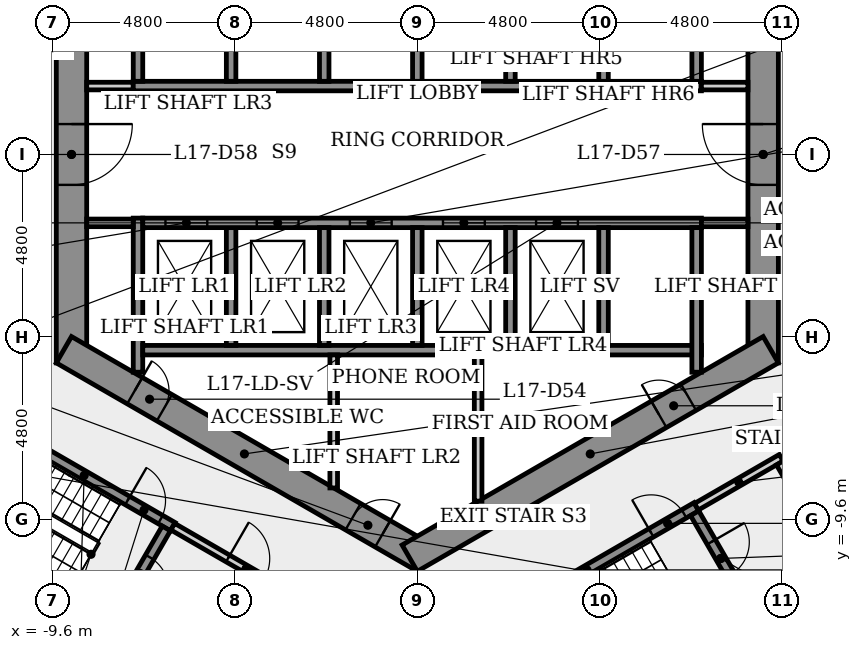
"""IFC4 building model, lengths in metres.
Left out: names, types, materials, properties, quantities, classifications, styles, units other than length and angle.
Written with IfcOpenShell. Run it as: python <this file> out.ifc"""

import sys

from ifc_helpers import new_model, si_unit, direction, frame, frame_2d, origin, place, context, subcontext, project, spatial, rectangle, extrude, element, fill, save


model = new_model("IFC4")
c1 = context("Model", 3, precision=1e-05, world=origin(), true_north=direction((0.0, 1.0)))
c2 = subcontext(c1, "Body", "Model", "MODEL_VIEW")
j1 = project(units=[si_unit("LENGTHUNIT", "METRE"), si_unit("PLANEANGLEUNIT", "RADIAN")], contexts=[c1])
p1 = place(None, origin())
s1 = spatial("IfcSite", under=j1, at=p1, CompositionType="ELEMENT")
p2 = place(p1, origin())
s2 = spatial("IfcBuilding", under=s1, at=p2, CompositionType="ELEMENT")
p3 = place(p2, frame((0.0, 0.0, 66.3)))
s3 = spatial("IfcBuildingStorey", under=s2, at=p3, CompositionType="ELEMENT", Elevation=66.3)
p4 = place(p3, frame((9.1, -5.485, 0.0), z_axis=(0.0, 0.0, 1.0), x_axis=(0.0, 1.0, 0.0)))
e1 = element("IfcWall", 1, at=p4, inside=s3, PredefinedType="SHEAR", context=c2, shape_type="SweptSolid", body=[
    extrude(rectangle(XDim=10.97, YDim=0.8, at=frame_2d((5.485, 0.0))), origin(), (0.0, 0.0, 1.0), 4.0),
])
p5 = place(p4, frame((4.685, 0.0, 0.0)))
e2 = element("IfcOpeningElement", 2, at=p5, cuts=e1, PredefinedType="OPENING", context=c2, shape_type="SweptSolid", body=[
    extrude(rectangle(XDim=1.6, YDim=2.1, at=frame_2d((0.8, 1.05))), frame((0.0, 0.41, 0.0), z_axis=(0.0, -1.0, 0.0), x_axis=(1.0, 0.0, 0.0)), (0.0, 0.0, 1.0), 0.82),
])
p6 = place(p3, frame((-9.1, 5.485, 0.0), z_axis=(0.0, 0.0, 1.0), x_axis=(0.0, -1.0, 0.0)))
e3 = element("IfcWall", 3, at=p6, inside=s3, PredefinedType="SHEAR", context=c2, shape_type="SweptSolid", body=[
    extrude(rectangle(XDim=10.97, YDim=0.8, at=frame_2d((5.485, 0.0))), origin(), (0.0, 0.0, 1.0), 4.0),
])
p7 = place(p6, frame((4.685, 0.0, 0.0)))
e4 = element("IfcOpeningElement", 4, at=p7, cuts=e3, PredefinedType="OPENING", context=c2, shape_type="SweptSolid", body=[
    extrude(rectangle(XDim=1.6, YDim=2.1, at=frame_2d((0.8, 1.05))), frame((0.0, 0.41, 0.0), z_axis=(0.0, -1.0, 0.0), x_axis=(1.0, 0.0, 0.0)), (0.0, 0.0, 1.0), 0.82),
])
p8 = place(p3, frame((-9.3, -5.138, 0.0), z_axis=(0.0, 0.0, 1.0), x_axis=(0.866023993627, -0.500002442456, 0.0)))
e5 = element("IfcWall", 5, at=p8, inside=s3, PredefinedType="SHEAR", context=c2, shape_type="SweptSolid", body=[
    extrude(rectangle(XDim=10.97, YDim=0.8, at=frame_2d((5.485, 0.0))), origin(), (0.0, 0.0, 1.0), 4.0),
])
p9 = place(p8, frame((2.153, 0.0, 0.0)))
e6 = element("IfcOpeningElement", 6, at=p9, cuts=e5, PredefinedType="OPENING", context=c2, shape_type="SweptSolid", body=[
    extrude(rectangle(XDim=0.9, YDim=2.1, at=frame_2d((0.45, 1.05))), frame((0.0, 0.41, 0.0), z_axis=(0.0, -1.0, 0.0), x_axis=(1.0, 0.0, 0.0)), (0.0, 0.0, 1.0), 0.82),
])
p10 = place(p8, frame((8.787, 0.0, 0.0)))
e7 = element("IfcOpeningElement", 7, at=p10, cuts=e5, PredefinedType="OPENING", context=c2, shape_type="SweptSolid", body=[
    extrude(rectangle(XDim=0.9, YDim=2.1, at=frame_2d((0.45, 1.05))), frame((0.0, 0.41, 0.0), z_axis=(0.0, -1.0, 0.0), x_axis=(1.0, 0.0, 0.0)), (0.0, 0.0, 1.0), 0.82),
])
p11 = place(p3, frame((-0.2, -10.623, 0.0), z_axis=(0.0, 0.0, 1.0), x_axis=(0.866023993627, 0.500002442456, 0.0)))
e8 = element("IfcWall", 8, at=p11, inside=s3, PredefinedType="SHEAR", context=c2, shape_type="SweptSolid", body=[
    extrude(rectangle(XDim=10.97, YDim=0.8, at=frame_2d((5.485, 0.0))), origin(), (0.0, 0.0, 1.0), 4.0),
])
p12 = place(p11, frame((7.57, 0.0, 0.0)))
e9 = element("IfcOpeningElement", 9, at=p12, cuts=e8, PredefinedType="OPENING", context=c2, shape_type="SweptSolid", body=[
    extrude(rectangle(XDim=0.9, YDim=2.1, at=frame_2d((0.45, 1.05))), frame((0.0, 0.41, 0.0), z_axis=(0.0, -1.0, 0.0), x_axis=(1.0, 0.0, 0.0)), (0.0, 0.0, 1.0), 0.82),
])
p13 = place(p3, frame((-11.1, -7.101, 0.0), z_axis=(0.0, 0.0, 1.0), x_axis=(0.866028615007, -0.499994437958, 0.0)))
e10 = element("IfcWall", 10, at=p13, inside=s3, PredefinedType="SHEAR", context=c2, shape_type="SweptSolid", body=[
    extrude(rectangle(XDim=5.387, YDim=0.25, at=frame_2d((2.694, 0.0))), origin(), (0.0, 0.0, 1.0), 3.6),
])
p14 = place(p13, frame((4.012, 0.0, 0.0)))
e11 = element("IfcOpeningElement", 11, at=p14, cuts=e10, PredefinedType="OPENING", context=c2, shape_type="SweptSolid", body=[
    extrude(rectangle(XDim=1.0, YDim=2.1, at=frame_2d((0.5, 1.05))), frame((0.0, 0.135, 0.0), z_axis=(0.0, -1.0, 0.0), x_axis=(1.0, 0.0, 0.0)), (0.0, 0.0, 1.0), 0.27),
])
p15 = place(p3, frame((-8.7, 1.8, 0.0), z_axis=(0.0, 0.0, 1.0), x_axis=(1.0, 0.0, 0.0)))
e12 = element("IfcWall", 12, at=p15, inside=s3, PredefinedType="PARTITIONING", context=c2, shape_type="SweptSolid", body=[
    extrude(rectangle(XDim=1.225, YDim=0.2, at=frame_2d((0.613, 0.0))), origin(), (0.0, 0.0, 1.0), 3.6),
])
p16 = place(p3, frame((-7.935, -12.393, 0.0), z_axis=(0.0, 0.0, 1.0), x_axis=(-0.866025499775, 0.499999833739, 0.0)))
e13 = element("IfcWall", 13, at=p16, inside=s3, PredefinedType="SHEAR", context=c2, shape_type="SweptSolid", body=[
    extrude(rectangle(XDim=6.4, YDim=0.25, at=frame_2d((3.2, 0.0))), origin(), (0.0, 0.0, 1.0), 3.6),
])
p17 = place(p3, frame((-7.475, 1.8, 0.0), z_axis=(0.0, 0.0, 1.0), x_axis=(1.0, 0.0, 0.0)))
e14 = element("IfcWall", 14, at=p17, inside=s3, PredefinedType="SHEAR", context=c2, shape_type="SweptSolid", body=[
    extrude(rectangle(XDim=14.95, YDim=0.25, at=frame_2d((7.475, 0.0))), origin(), (0.0, 0.0, 1.0), 3.6),
])
p18 = place(p3, frame((-7.35, -5.73, 0.0), z_axis=(0.0, 0.0, 1.0), x_axis=(0.0, 1.0, 0.0)))
e15 = element("IfcWall", 15, at=p18, inside=s3, PredefinedType="SHEAR", context=c2, shape_type="SweptSolid", body=[
    extrude(rectangle(XDim=4.055, YDim=0.25, at=frame_2d((2.028, 0.0))), origin(), (0.0, 0.0, 1.0), 3.6),
])
p19 = place(p3, frame((-7.35, 1.925, 0.0), z_axis=(0.0, 0.0, 1.0), x_axis=(0.0, 1.0, 0.0)))
e16 = element("IfcWall", 16, at=p19, inside=s3, PredefinedType="SHEAR", context=c2, shape_type="SweptSolid", body=[
    extrude(rectangle(XDim=3.805, YDim=0.25, at=frame_2d((1.903, 0.0))), origin(), (0.0, 0.0, 1.0), 3.6),
])
p20 = place(p3, frame((-7.475, -1.8, 0.0), z_axis=(0.0, 0.0, 1.0), x_axis=(-1.0, 0.0, 0.0)))
e17 = element("IfcWall", 17, at=p20, inside=s3, PredefinedType="PARTITIONING", context=c2, shape_type="SweptSolid", body=[
    extrude(rectangle(XDim=1.225, YDim=0.2, at=frame_2d((0.613, 0.0))), origin(), (0.0, 0.0, 1.0), 3.6),
])
p21 = place(p3, frame((-6.605, -9.841, 0.0), z_axis=(0.0, 0.0, 1.0), x_axis=(-0.499996545922, -0.866027397988, 0.0)))
e18 = element("IfcWall", 18, at=p21, inside=s3, PredefinedType="SHEAR", context=c2, shape_type="SweptSolid", body=[
    extrude(rectangle(XDim=2.75, YDim=0.25, at=frame_2d((1.375, 0.0))), origin(), (0.0, 0.0, 1.0), 3.6),
])
p22 = place(p21, frame((0.875, 0.0, 0.0)))
e19 = element("IfcOpeningElement", 19, at=p22, cuts=e18, PredefinedType="OPENING", context=c2, shape_type="SweptSolid", body=[
    extrude(rectangle(XDim=1.0, YDim=2.1, at=frame_2d((0.5, 1.05))), frame((0.0, 0.135, 0.0), z_axis=(0.0, -1.0, 0.0), x_axis=(1.0, 0.0, 0.0)), (0.0, 0.0, 1.0), 0.27),
])
p23 = place(p3, frame((-6.435, -9.795, 0.0), z_axis=(0.0, 0.0, 1.0), x_axis=(0.866012907634, -0.500021643343, 0.0)))
e20 = element("IfcWall", 20, at=p23, inside=s3, PredefinedType="PARTITIONING", context=c2, shape_type="SweptSolid", body=[
    extrude(rectangle(XDim=4.45, YDim=0.2, at=frame_2d((2.225, 0.0))), origin(), (0.0, 0.0, 1.0), 3.6),
])
p24 = place(p23, frame((1.675, 0.0, 0.0)))
e21 = element("IfcOpeningElement", 21, at=p24, cuts=e20, PredefinedType="OPENING", context=c2, shape_type="SweptSolid", body=[
    extrude(rectangle(XDim=1.1, YDim=2.1, at=frame_2d((0.55, 1.05))), frame((0.0, 0.11, 0.0), z_axis=(0.0, -1.0, 0.0), x_axis=(1.0, 0.0, 0.0)), (0.0, 0.0, 1.0), 0.22),
])
p25 = place(p3, frame((-7.225, -5.15, 0.0), z_axis=(0.0, 0.0, 1.0), x_axis=(1.0, 0.0, 0.0)))
e22 = element("IfcWall", 22, at=p25, inside=s3, PredefinedType="SHEAR", context=c2, shape_type="SweptSolid", body=[
    extrude(rectangle(XDim=14.7, YDim=0.25, at=frame_2d((7.35, 0.0))), origin(), (0.0, 0.0, 1.0), 3.6),
])
for number, where, z_axis, x_axis in (
    (23, (-4.9, -1.925, 0.0), (0.0, 0.0, 1.0), (0.0, -1.0, 0.0)),
    (24, (-4.9, 5.025, 0.0), (0.0, 0.0, 1.0), (0.0, -1.0, 0.0)),
):
    element("IfcWall", number, at=place(p3, frame(where, z_axis=z_axis, x_axis=x_axis)), inside=s3, PredefinedType="SHEAR", context=c2, shape_type="SweptSolid", body=[
        extrude(rectangle(XDim=3.1, YDim=0.25, at=frame_2d((1.55, 0.0))), origin(), (0.0, 0.0, 1.0), 4.0),
    ])
p26 = place(p3, frame((-7.225, -1.8, 0.0), z_axis=(0.0, 0.0, 1.0), x_axis=(1.0, 0.0, 0.0)))
e25 = element("IfcWall", 25, at=p26, inside=s3, PredefinedType="SHEAR", context=c2, shape_type="SweptSolid", body=[
    extrude(rectangle(XDim=14.7, YDim=0.25, at=frame_2d((7.35, 0.0))), origin(), (0.0, 0.0, 1.0), 3.6),
])
p27 = place(p26, frame((0.597, 0.0, 0.0)))
e26 = element("IfcOpeningElement", 26, at=p27, cuts=e25, PredefinedType="OPENING", context=c2, shape_type="SweptSolid", body=[
    extrude(rectangle(XDim=1.1, YDim=2.1, at=frame_2d((0.55, 1.05))), frame((0.0, 0.135, 0.0), z_axis=(0.0, -1.0, 0.0), x_axis=(1.0, 0.0, 0.0)), (0.0, 0.0, 1.0), 0.27),
])
p28 = place(p26, frame((3.0, 0.0, 0.0)))
e27 = element("IfcOpeningElement", 27, at=p28, cuts=e25, PredefinedType="OPENING", context=c2, shape_type="SweptSolid", body=[
    extrude(rectangle(XDim=1.1, YDim=2.1, at=frame_2d((0.55, 1.05))), frame((0.0, 0.135, 0.0), z_axis=(0.0, -1.0, 0.0), x_axis=(1.0, 0.0, 0.0)), (0.0, 0.0, 1.0), 0.27),
])
p29 = place(p26, frame((5.45, 0.0, 0.0)))
e28 = element("IfcOpeningElement", 28, at=p29, cuts=e25, PredefinedType="OPENING", context=c2, shape_type="SweptSolid", body=[
    extrude(rectangle(XDim=1.1, YDim=2.1, at=frame_2d((0.55, 1.05))), frame((0.0, 0.135, 0.0), z_axis=(0.0, -1.0, 0.0), x_axis=(1.0, 0.0, 0.0)), (0.0, 0.0, 1.0), 0.27),
])
p30 = place(p26, frame((7.9, 0.0, 0.0)))
e29 = element("IfcOpeningElement", 29, at=p30, cuts=e25, PredefinedType="OPENING", context=c2, shape_type="SweptSolid", body=[
    extrude(rectangle(XDim=1.1, YDim=2.1, at=frame_2d((0.55, 1.05))), frame((0.0, 0.135, 0.0), z_axis=(0.0, -1.0, 0.0), x_axis=(1.0, 0.0, 0.0)), (0.0, 0.0, 1.0), 0.27),
])
p31 = place(p26, frame((10.35, 0.0, 0.0)))
e30 = element("IfcOpeningElement", 30, at=p31, cuts=e25, PredefinedType="OPENING", context=c2, shape_type="SweptSolid", body=[
    extrude(rectangle(XDim=1.1, YDim=2.1, at=frame_2d((0.55, 1.05))), frame((0.0, 0.135, 0.0), z_axis=(0.0, -1.0, 0.0), x_axis=(1.0, 0.0, 0.0)), (0.0, 0.0, 1.0), 0.27),
])
for number, where, z_axis, x_axis in (
    (31, (-2.45, -1.925, 0.0), (0.0, 0.0, 1.0), (0.0, -1.0, 0.0)),
    (32, (-2.45, 5.025, 0.0), (0.0, 0.0, 1.0), (0.0, -1.0, 0.0)),
):
    element("IfcWall", number, at=place(p3, frame(where, z_axis=z_axis, x_axis=x_axis)), inside=s3, PredefinedType="SHEAR", context=c2, shape_type="SweptSolid", body=[
        extrude(rectangle(XDim=3.1, YDim=0.25, at=frame_2d((1.55, 0.0))), origin(), (0.0, 0.0, 1.0), 4.0),
    ])
p32 = place(p3, frame((-2.2, -5.275, 0.0), z_axis=(0.0, 0.0, 1.0), x_axis=(0.0, -1.0, 0.0)))
e33 = element("IfcWall", 33, at=p32, inside=s3, PredefinedType="PARTITIONING", context=c2, shape_type="SweptSolid", body=[
    extrude(rectangle(XDim=3.501, YDim=0.2, at=frame_2d((1.75, 0.0))), origin(), (0.0, 0.0, 1.0), 3.6),
])
for number, where, z_axis, x_axis in (
    (34, (0.0, -1.925, 0.0), (0.0, 0.0, 1.0), (0.0, -1.0, 0.0)),
    (35, (0.0, 5.025, 0.0), (0.0, 0.0, 1.0), (0.0, -1.0, 0.0)),
):
    element("IfcWall", number, at=place(p3, frame(where, z_axis=z_axis, x_axis=x_axis)), inside=s3, PredefinedType="SHEAR", context=c2, shape_type="SweptSolid", body=[
        extrude(rectangle(XDim=3.1, YDim=0.25, at=frame_2d((1.55, 0.0))), origin(), (0.0, 0.0, 1.0), 4.0),
    ])
p33 = place(p3, frame((1.6, -5.275, 0.0), z_axis=(0.0, 0.0, 1.0), x_axis=(0.0, -1.0, 0.0)))
e36 = element("IfcWall", 36, at=p33, inside=s3, PredefinedType="PARTITIONING", context=c2, shape_type="SweptSolid", body=[
    extrude(rectangle(XDim=3.847, YDim=0.2, at=frame_2d((1.924, 0.0))), origin(), (0.0, 0.0, 1.0), 3.6),
])
p34 = place(p3, frame((1.585, -12.595, 0.0), z_axis=(0.0, 0.0, 1.0), x_axis=(0.866036417653, 0.499980922934, 0.0)))
e37 = element("IfcWall", 37, at=p34, inside=s3, PredefinedType="SHEAR", context=c2, shape_type="SweptSolid", body=[
    extrude(rectangle(XDim=6.65, YDim=0.25, at=frame_2d((3.325, 0.0))), origin(), (0.0, 0.0, 1.0), 3.6),
])
p35 = place(p34, frame((5.275, 0.0, 0.0)))
e38 = element("IfcOpeningElement", 38, at=p35, cuts=e37, PredefinedType="OPENING", context=c2, shape_type="SweptSolid", body=[
    extrude(rectangle(XDim=1.0, YDim=2.1, at=frame_2d((0.5, 1.05))), frame((0.0, 0.135, 0.0), z_axis=(0.0, -1.0, 0.0), x_axis=(1.0, 0.0, 0.0)), (0.0, 0.0, 1.0), 0.27),
])
for number, where, z_axis, x_axis in (
    (39, (2.45, -1.925, 0.0), (0.0, 0.0, 1.0), (0.0, -1.0, 0.0)),
    (40, (2.45, 5.025, 0.0), (0.0, 0.0, 1.0), (0.0, -1.0, 0.0)),
    (41, (4.9, -1.925, 0.0), (0.0, 0.0, 1.0), (0.0, -1.0, 0.0)),
    (42, (4.9, 5.025, 0.0), (0.0, 0.0, 1.0), (0.0, -1.0, 0.0)),
):
    element("IfcWall", number, at=place(p3, frame(where, z_axis=z_axis, x_axis=x_axis)), inside=s3, PredefinedType="SHEAR", context=c2, shape_type="SweptSolid", body=[
        extrude(rectangle(XDim=3.1, YDim=0.25, at=frame_2d((1.55, 0.0))), origin(), (0.0, 0.0, 1.0), 4.0),
    ])
p36 = place(p3, frame((7.298, -9.441, 0.0), z_axis=(0.0, 0.0, 1.0), x_axis=(0.500034990121, -0.866005201286, 0.0)))
e43 = element("IfcWall", 43, at=p36, inside=s3, PredefinedType="SHEAR", context=c2, shape_type="SweptSolid", body=[
    extrude(rectangle(XDim=2.75, YDim=0.25, at=frame_2d((1.375, 0.0))), origin(), (0.0, 0.0, 1.0), 3.6),
])
p37 = place(p36, frame((0.875, 0.0, 0.0)))
e44 = element("IfcOpeningElement", 44, at=p37, cuts=e43, PredefinedType="OPENING", context=c2, shape_type="SweptSolid", body=[
    extrude(rectangle(XDim=1.0, YDim=2.1, at=frame_2d((0.5, 1.05))), frame((0.0, 0.135, 0.0), z_axis=(0.0, -1.0, 0.0), x_axis=(1.0, 0.0, 0.0)), (0.0, 0.0, 1.0), 0.27),
])
p38 = place(p3, frame((7.344, -9.27, 0.0), z_axis=(0.0, 0.0, 1.0), x_axis=(0.866005588531, 0.500034319456, 0.0)))
e45 = element("IfcWall", 45, at=p38, inside=s3, PredefinedType="PARTITIONING", context=c2, shape_type="SweptSolid", body=[
    extrude(rectangle(XDim=2.575, YDim=0.2, at=frame_2d((1.288, 0.0))), origin(), (0.0, 0.0, 1.0), 3.6),
])
p39 = place(p3, frame((7.475, 1.8, 0.0), z_axis=(0.0, 0.0, 1.0), x_axis=(1.0, 0.0, 0.0)))
e46 = element("IfcWall", 46, at=p39, inside=s3, PredefinedType="PARTITIONING", context=c2, shape_type="SweptSolid", body=[
    extrude(rectangle(XDim=1.225, YDim=0.2, at=frame_2d((0.613, 0.0))), origin(), (0.0, 0.0, 1.0), 3.6),
])
for number, where, z_axis, x_axis in (
    (47, (7.35, -1.925, 0.0), (0.0, 0.0, 1.0), (0.0, -1.0, 0.0)),
    (48, (7.35, 5.73, 0.0), (0.0, 0.0, 1.0), (0.0, -1.0, 0.0)),
):
    element("IfcWall", number, at=place(p3, frame(where, z_axis=z_axis, x_axis=x_axis)), inside=s3, PredefinedType="SHEAR", context=c2, shape_type="SweptSolid", body=[
        extrude(rectangle(XDim=3.805, YDim=0.25, at=frame_2d((1.903, 0.0))), origin(), (0.0, 0.0, 1.0), 3.6),
    ])
p40 = place(p3, frame((8.7, -1.8, 0.0), z_axis=(0.0, 0.0, 1.0), x_axis=(-1.0, 0.0, 0.0)))
e49 = element("IfcWall", 49, at=p40, inside=s3, PredefinedType="PARTITIONING", context=c2, shape_type="SweptSolid", body=[
    extrude(rectangle(XDim=1.225, YDim=0.2, at=frame_2d((0.613, 0.0))), origin(), (0.0, 0.0, 1.0), 3.6),
])
p41 = place(p3, frame((9.537, -8.119, 0.0), z_axis=(0.0, 0.0, 1.0), x_axis=(0.499990139034, -0.866031096941, 0.0)))
e50 = element("IfcWall", 50, at=p41, inside=s3, PredefinedType="PARTITIONING", context=c2, shape_type="SweptSolid", body=[
    extrude(rectangle(XDim=3.0, YDim=0.2, at=frame_2d((1.5, 0.0))), origin(), (0.0, 0.0, 1.0), 3.6),
])
p42 = place(p41, frame((0.935, 0.0, 0.0)))
e51 = element("IfcOpeningElement", 51, at=p42, cuts=e50, PredefinedType="OPENING", context=c2, shape_type="SweptSolid", body=[
    extrude(rectangle(XDim=1.0, YDim=2.1, at=frame_2d((0.5, 1.05))), frame((0.0, 0.11, 0.0), z_axis=(0.0, -1.0, 0.0), x_axis=(1.0, 0.0, 0.0)), (0.0, 0.0, 1.0), 0.22),
])
p43 = place(p3, frame((10.901, -10.681, 0.0), z_axis=(0.0, 0.0, 1.0), x_axis=(-0.866007538022, -0.500030943131, 0.0)))
e52 = element("IfcWall", 52, at=p43, inside=s3, PredefinedType="PLUMBINGWALL", context=c2, shape_type="SweptSolid", body=[
    extrude(rectangle(XDim=2.375, YDim=0.2, at=frame_2d((1.188, 0.0))), origin(), (0.0, 0.0, 1.0), 3.6),
])
p44 = place(p27, origin())
e53 = element("IfcDoor", 53, at=p44, inside=s3, OperationType="SLIDING_TO_LEFT", PredefinedType="DOOR", context=c2, shape_type="SweptSolid", body=[
    extrude(rectangle(XDim=1.1, YDim=2.1, at=frame_2d((0.55, 1.05))), frame((0.0, 0.025, 0.0), z_axis=(0.0, -1.0, 0.0), x_axis=(1.0, 0.0, 0.0)), (0.0, 0.0, 1.0), 0.05),
])
fill(e26, e53)
p45 = place(p28, origin())
e54 = element("IfcDoor", 54, at=p45, inside=s3, OperationType="SLIDING_TO_LEFT", PredefinedType="DOOR", context=c2, shape_type="SweptSolid", body=[
    extrude(rectangle(XDim=1.1, YDim=2.1, at=frame_2d((0.55, 1.05))), frame((0.0, 0.025, 0.0), z_axis=(0.0, -1.0, 0.0), x_axis=(1.0, 0.0, 0.0)), (0.0, 0.0, 1.0), 0.05),
])
fill(e27, e54)
p46 = place(p29, origin())
e55 = element("IfcDoor", 55, at=p46, inside=s3, OperationType="SLIDING_TO_LEFT", PredefinedType="DOOR", context=c2, shape_type="SweptSolid", body=[
    extrude(rectangle(XDim=1.1, YDim=2.1, at=frame_2d((0.55, 1.05))), frame((0.0, 0.025, 0.0), z_axis=(0.0, -1.0, 0.0), x_axis=(1.0, 0.0, 0.0)), (0.0, 0.0, 1.0), 0.05),
])
fill(e28, e55)
p47 = place(p30, origin())
e56 = element("IfcDoor", 56, at=p47, inside=s3, OperationType="SLIDING_TO_LEFT", PredefinedType="DOOR", context=c2, shape_type="SweptSolid", body=[
    extrude(rectangle(XDim=1.1, YDim=2.1, at=frame_2d((0.55, 1.05))), frame((0.0, 0.025, 0.0), z_axis=(0.0, -1.0, 0.0), x_axis=(1.0, 0.0, 0.0)), (0.0, 0.0, 1.0), 0.05),
])
fill(e29, e56)
p48 = place(p31, origin())
e57 = element("IfcDoor", 57, at=p48, inside=s3, OperationType="SLIDING_TO_LEFT", PredefinedType="DOOR", context=c2, shape_type="SweptSolid", body=[
    extrude(rectangle(XDim=1.1, YDim=2.1, at=frame_2d((0.55, 1.05))), frame((0.0, 0.025, 0.0), z_axis=(0.0, -1.0, 0.0), x_axis=(1.0, 0.0, 0.0)), (0.0, 0.0, 1.0), 0.05),
])
fill(e30, e57)
p49 = place(p14, origin())
e58 = element("IfcDoor", 58, at=p49, inside=s3, OperationType="SINGLE_SWING_LEFT", PredefinedType="DOOR", context=c2, shape_type="SweptSolid", body=[
    extrude(rectangle(XDim=1.0, YDim=2.1, at=frame_2d((0.5, 1.05))), frame((0.0, 0.025, 0.0), z_axis=(0.0, -1.0, 0.0), x_axis=(1.0, 0.0, 0.0)), (0.0, 0.0, 1.0), 0.05),
])
fill(e11, e58)
p50 = place(p22, origin())
e59 = element("IfcDoor", 59, at=p50, inside=s3, OperationType="SINGLE_SWING_RIGHT", PredefinedType="DOOR", context=c2, shape_type="SweptSolid", body=[
    extrude(rectangle(XDim=1.0, YDim=2.1, at=frame_2d((0.5, 1.05))), frame((0.0, 0.025, 0.0), z_axis=(0.0, -1.0, 0.0), x_axis=(1.0, 0.0, 0.0)), (0.0, 0.0, 1.0), 0.05),
])
fill(e19, e59)
p51 = place(p24, origin())
e60 = element("IfcDoor", 60, at=p51, inside=s3, OperationType="SINGLE_SWING_LEFT", PredefinedType="DOOR", context=c2, shape_type="SweptSolid", body=[
    extrude(rectangle(XDim=1.1, YDim=2.1, at=frame_2d((0.55, 1.05))), frame((0.0, 0.025, 0.0), z_axis=(0.0, -1.0, 0.0), x_axis=(1.0, 0.0, 0.0)), (0.0, 0.0, 1.0), 0.05),
])
fill(e21, e60)
p52 = place(p35, origin())
e61 = element("IfcDoor", 61, at=p52, inside=s3, OperationType="SINGLE_SWING_LEFT", PredefinedType="DOOR", context=c2, shape_type="SweptSolid", body=[
    extrude(rectangle(XDim=1.0, YDim=2.1, at=frame_2d((0.5, 1.05))), frame((0.0, 0.025, 0.0), z_axis=(0.0, -1.0, 0.0), x_axis=(1.0, 0.0, 0.0)), (0.0, 0.0, 1.0), 0.05),
])
fill(e38, e61)
p53 = place(p37, origin())
e62 = element("IfcDoor", 62, at=p53, inside=s3, OperationType="SINGLE_SWING_LEFT", PredefinedType="DOOR", context=c2, shape_type="SweptSolid", body=[
    extrude(rectangle(XDim=1.0, YDim=2.1, at=frame_2d((0.5, 1.05))), frame((0.0, 0.025, 0.0), z_axis=(0.0, -1.0, 0.0), x_axis=(1.0, 0.0, 0.0)), (0.0, 0.0, 1.0), 0.05),
])
fill(e44, e62)
p54 = place(p9, origin())
e63 = element("IfcDoor", 63, at=p54, inside=s3, OperationType="SINGLE_SWING_LEFT", PredefinedType="DOOR", context=c2, shape_type="SweptSolid", body=[
    extrude(rectangle(XDim=0.9, YDim=2.1, at=frame_2d((0.45, 1.05))), frame((0.0, 0.025, 0.0), z_axis=(0.0, -1.0, 0.0), x_axis=(1.0, 0.0, 0.0)), (0.0, 0.0, 1.0), 0.05),
])
fill(e6, e63)
p55 = place(p10, origin())
e64 = element("IfcDoor", 64, at=p55, inside=s3, OperationType="SINGLE_SWING_RIGHT", PredefinedType="DOOR", context=c2, shape_type="SweptSolid", body=[
    extrude(rectangle(XDim=0.9, YDim=2.1, at=frame_2d((0.45, 1.05))), frame((0.0, 0.025, 0.0), z_axis=(0.0, -1.0, 0.0), x_axis=(1.0, 0.0, 0.0)), (0.0, 0.0, 1.0), 0.05),
])
fill(e7, e64)
p56 = place(p12, origin())
e65 = element("IfcDoor", 65, at=p56, inside=s3, OperationType="SINGLE_SWING_LEFT", PredefinedType="DOOR", context=c2, shape_type="SweptSolid", body=[
    extrude(rectangle(XDim=0.9, YDim=2.1, at=frame_2d((0.45, 1.05))), frame((0.0, 0.025, 0.0), z_axis=(0.0, -1.0, 0.0), x_axis=(1.0, 0.0, 0.0)), (0.0, 0.0, 1.0), 0.05),
])
fill(e9, e65)
p57 = place(p5, origin())
e66 = element("IfcDoor", 66, at=p57, inside=s3, OperationType="SINGLE_SWING_RIGHT", PredefinedType="DOOR", context=c2, shape_type="SweptSolid", body=[
    extrude(rectangle(XDim=1.6, YDim=2.1, at=frame_2d((0.8, 1.05))), frame((0.0, 0.025, 0.0), z_axis=(0.0, -1.0, 0.0), x_axis=(1.0, 0.0, 0.0)), (0.0, 0.0, 1.0), 0.05),
])
fill(e2, e66)
p58 = place(p7, origin())
e67 = element("IfcDoor", 67, at=p58, inside=s3, OperationType="SINGLE_SWING_LEFT", PredefinedType="DOOR", context=c2, shape_type="SweptSolid", body=[
    extrude(rectangle(XDim=1.6, YDim=2.1, at=frame_2d((0.8, 1.05))), frame((0.0, 0.025, 0.0), z_axis=(0.0, -1.0, 0.0), x_axis=(1.0, 0.0, 0.0)), (0.0, 0.0, 1.0), 0.05),
])
fill(e4, e67)
save(model, sys.argv[1])
